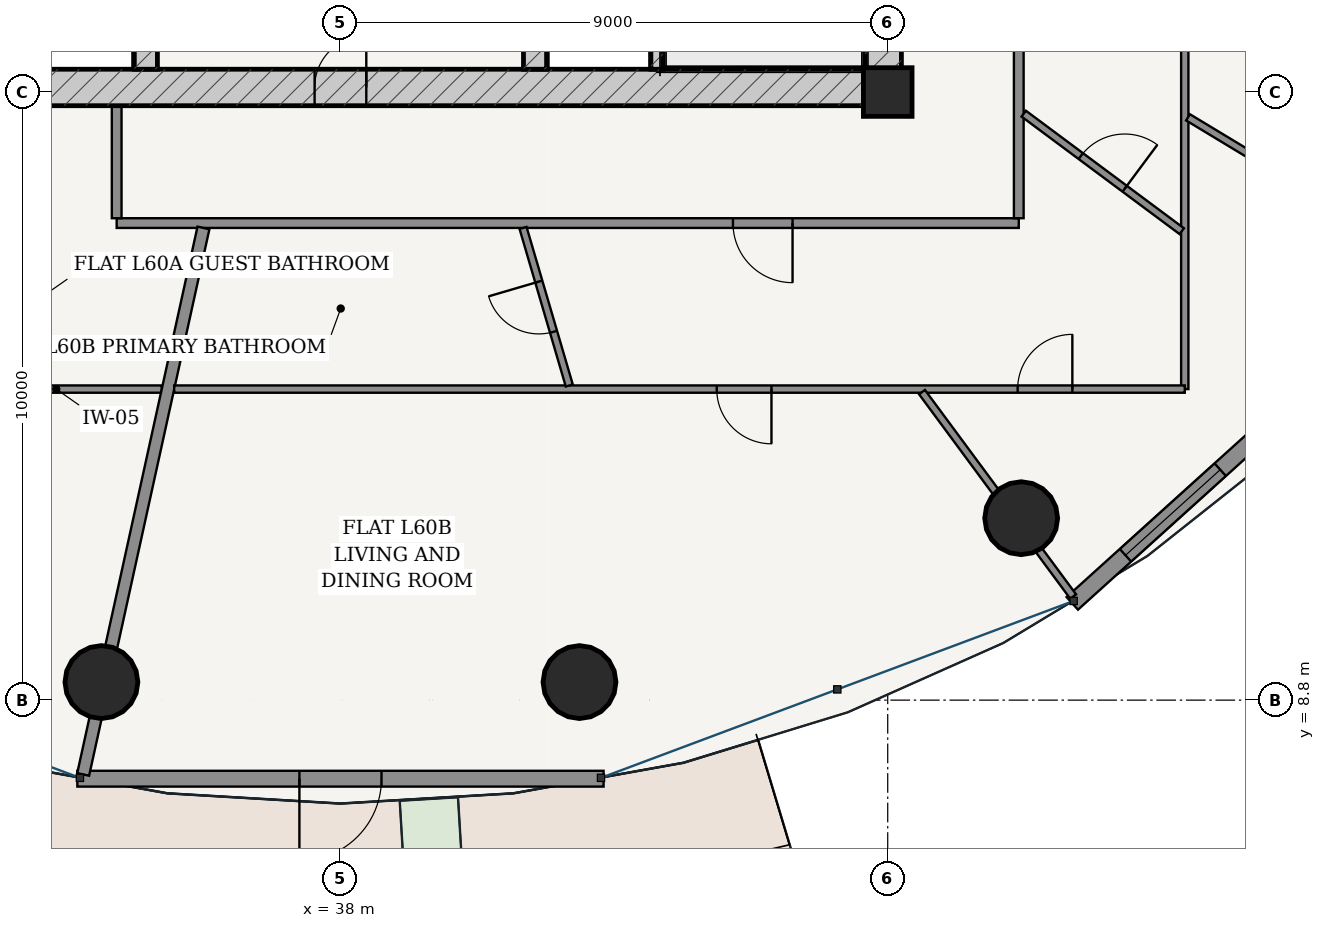
"""IFC4 building model, lengths in metres.
Left out: names, types, materials, properties, quantities, classifications, styles, units other than length and angle.
Written with IfcOpenShell. Run it as: python <this file> out.ifc"""

import sys

from ifc_helpers import new_model, si_unit, direction, frame, frame_2d, origin, origin_2d, place, context, subcontext, project, spatial, rectangle, hollow_circle, extrude, source, transform, mapped, element, fill, save


model = new_model("IFC4")
c1 = context("Model", 3, precision=1e-05, world=origin(), true_north=direction((-0.2419218956, 0.970295726276)))
c2 = subcontext(c1, "Body", "Model", "MODEL_VIEW")
j1 = project(units=[si_unit("LENGTHUNIT", "METRE"), si_unit("PLANEANGLEUNIT", "RADIAN")], contexts=[c1])
p1 = place(None, origin())
s1 = spatial("IfcSite", under=j1, at=p1, CompositionType="ELEMENT")
p2 = place(p1, origin())
s2 = spatial("IfcBuilding", under=s1, at=p2, CompositionType="ELEMENT")
p3 = place(p2, frame((0.0, 0.0, 228.2)))
s3 = spatial("IfcBuildingStorey", under=s2, at=p3, CompositionType="ELEMENT", Elevation=228.2)
p4 = place(p3, frame((47.0, 18.8, 0.0), z_axis=(0.0, 0.0, 1.0), x_axis=(1.0, 0.0, 0.0)))
e1 = element("IfcColumn", 1, at=p4, inside=s3, PredefinedType="COLUMN", context=c2, shape_type="SweptSolid", body=[
    extrude(rectangle(XDim=0.8, YDim=0.8, at=origin_2d()), origin(), (0.0, 0.0, 1.0), 3.7),
])
p5 = place(p3, frame((28.775, 18.875, 0.0), z_axis=(0.0, 0.0, 1.0), x_axis=(1.0, 0.0, 0.0)))
e2 = element("IfcWall", 2, at=p5, inside=s3, PredefinedType="SHEAR", context=c2, shape_type="SweptSolid", body=[
    extrude(rectangle(XDim=18.45, YDim=0.6, at=frame_2d((9.225, 0.0))), origin(), (0.0, 0.0, 1.0), 3.435),
])
p6 = place(p5, frame((8.8, 0.0, 0.0)))
e3 = element("IfcOpeningElement", 3, at=p6, cuts=e2, PredefinedType="OPENING", context=c2, shape_type="SweptSolid", body=[
    extrude(rectangle(XDim=0.85, YDim=2.1, at=frame_2d((0.425, 1.05))), frame((0.0, 0.31, 0.0), z_axis=(0.0, -1.0, 0.0), x_axis=(1.0, 0.0, 0.0)), (0.0, 0.0, 1.0), 0.62),
])
p7 = place(p3, frame((46.925, 19.175, 0.0), z_axis=(0.0, 0.0, 1.0), x_axis=(0.0, 1.0, 0.0)))
e4 = element("IfcWall", 4, at=p7, inside=s3, PredefinedType="SHEAR", context=c2, shape_type="SweptSolid", body=[
    extrude(rectangle(XDim=15.25, YDim=0.6, at=frame_2d((7.625, 0.0))), origin(), (0.0, 0.0, 1.0), 3.435),
])
p8 = place(p7, frame((9.875, 0.0, 0.0)))
e5 = element("IfcOpeningElement", 5, at=p8, cuts=e4, PredefinedType="OPENING", context=c2, shape_type="SweptSolid", body=[
    extrude(rectangle(XDim=1.5, YDim=2.2, at=frame_2d((0.75, 1.1))), frame((0.0, 0.31, 0.0), z_axis=(0.0, -1.0, 0.0), x_axis=(1.0, 0.0, 0.0)), (0.0, 0.0, 1.0), 0.62),
])
p9 = place(p3, frame((43.205, 19.175, 0.0), z_axis=(0.0, 0.0, 1.0), x_axis=(0.0, 1.0, 0.0)))
e6 = element("IfcWall", 6, at=p9, inside=s3, PredefinedType="SOLIDWALL", context=c2, shape_type="SweptSolid", body=[
    extrude(rectangle(XDim=7.375, YDim=0.2, at=frame_2d((3.688, 0.0))), origin(), (0.0, 0.0, 1.0), 3.435),
])
p10 = place(p3, frame((34.8, 19.175, 0.0), z_axis=(0.0, 0.0, 1.0), x_axis=(0.0, 1.0, 0.0)))
e7 = element("IfcWall", 7, at=p10, inside=s3, PredefinedType="SHEAR", context=c2, shape_type="SweptSolid", body=[
    extrude(rectangle(XDim=15.25, YDim=0.38, at=frame_2d((7.625, 0.0))), origin(), (0.0, 0.0, 1.0), 3.435),
])
p11 = place(p10, frame((7.8, 0.0, 0.0)))
e8 = element("IfcOpeningElement", 8, at=p11, cuts=e7, PredefinedType="OPENING", context=c2, shape_type="SweptSolid", body=[
    extrude(rectangle(XDim=1.05, YDim=2.15, at=frame_2d((0.525, 1.075))), frame((0.0, 0.2, 0.0), z_axis=(0.0, -1.0, 0.0), x_axis=(1.0, 0.0, 0.0)), (0.0, 0.0, 1.0), 0.4),
])
p12 = place(p3, frame((41.2, 19.175, 0.0), z_axis=(0.0, 0.0, 1.0), x_axis=(0.0, 1.0, 0.0)))
e9 = element("IfcWall", 9, at=p12, inside=s3, PredefinedType="SHEAR", context=c2, shape_type="SweptSolid", body=[
    extrude(rectangle(XDim=15.25, YDim=0.38, at=frame_2d((7.625, 0.0))), origin(), (0.0, 0.0, 1.0), 3.435),
])
p13 = place(p12, frame((7.8, 0.0, 0.0)))
e10 = element("IfcOpeningElement", 10, at=p13, cuts=e9, PredefinedType="OPENING", context=c2, shape_type="SweptSolid", body=[
    extrude(rectangle(XDim=1.05, YDim=2.15, at=frame_2d((0.525, 1.075))), frame((0.0, 0.2, 0.0), z_axis=(0.0, -1.0, 0.0), x_axis=(1.0, 0.0, 0.0)), (0.0, 0.0, 1.0), 0.4),
])
for number, where, z_axis, x_axis in (
    (11, (34.069, 9.097, 0.0), (0.0, 0.0, 1.0), (1.0, 0.0, 0.0)),
    (12, (41.931, 9.097, 0.0), (0.0, 0.0, 1.0), (1.0, 0.0, 0.0)),
    (13, (49.195, 11.792, 0.0), (0.0, 0.0, 1.0), (1.0, 0.0, 0.0)),
):
    element("IfcColumn", number, at=place(p3, frame(where, z_axis=z_axis, x_axis=x_axis)), inside=s3, PredefinedType="COLUMN", context=c2, shape_type="SweptSolid", body=[
        extrude(hollow_circle(Radius=0.6, WallThickness=0.038, at=origin_2d()), origin(), (0.0, 0.0, 1.0), 3.7),
    ])
p14 = place(p3, frame((33.673, 7.508, 0.0), z_axis=(0.0, 0.0, 1.0), x_axis=(1.0, 0.0, 0.0)))
e14 = element("IfcWall", 14, at=p14, inside=s3, PredefinedType="SOLIDWALL", context=c2, shape_type="SweptSolid", body=[
    extrude(rectangle(XDim=8.654, YDim=0.26, at=frame_2d((4.327, 0.0))), origin(), (0.0, 0.0, 1.0), 3.435),
])
p15 = place(p14, frame((3.652, 0.0, 0.0)))
e15 = element("IfcOpeningElement", 15, at=p15, cuts=e14, PredefinedType="OPENING", context=c2, shape_type="SweptSolid", body=[
    extrude(rectangle(XDim=1.35, YDim=2.2, at=frame_2d((0.675, 1.1))), frame((0.0, 0.14, 0.0), z_axis=(0.0, -1.0, 0.0), x_axis=(1.0, 0.0, 0.0)), (0.0, 0.0, 1.0), 0.28),
])
p16 = place(p3, frame((50.035, 10.391, 0.0), z_axis=(0.0, 0.0, 1.0), x_axis=(0.741986838603, 0.670414447443, 0.0)))
e16 = element("IfcWall", 16, at=p16, inside=s3, PredefinedType="SOLIDWALL", context=c2, shape_type="SweptSolid", body=[
    extrude(rectangle(XDim=8.255, YDim=0.28, at=frame_2d((4.127, 0.0))), origin(), (0.0, 0.0, 1.0), 3.435),
])
p17 = place(p16, frame((1.179, 0.0, 0.85)))
e17 = element("IfcOpeningElement", 17, at=p17, cuts=e16, PredefinedType="OPENING", context=c2, shape_type="SweptSolid", body=[
    extrude(rectangle(XDim=2.1, YDim=1.95, at=frame_2d((1.05, 0.975))), frame((0.0, 0.15, 0.0), z_axis=(0.0, -1.0, 0.0), x_axis=(1.0, 0.0, 0.0)), (0.0, 0.0, 1.0), 0.3),
])
p18 = place(p16, frame((4.976, 0.0, 0.85)))
e18 = element("IfcOpeningElement", 18, at=p18, cuts=e16, PredefinedType="OPENING", context=c2, shape_type="SweptSolid", body=[
    extrude(rectangle(XDim=2.1, YDim=1.95, at=frame_2d((1.05, 0.975))), frame((0.0, 0.15, 0.0), z_axis=(0.0, -1.0, 0.0), x_axis=(1.0, 0.0, 0.0)), (0.0, 0.0, 1.0), 0.3),
])
p19 = place(p3, frame((34.32, 16.645, 0.0), z_axis=(0.0, 0.0, 1.0), x_axis=(1.0, 0.0, 0.0)))
e19 = element("IfcWall", 19, at=p19, inside=s3, PredefinedType="PARTITIONING", context=c2, shape_type="SweptSolid", body=[
    extrude(rectangle(XDim=14.835, YDim=0.16, at=frame_2d((7.417, 0.0))), origin(), (0.0, 0.0, 1.0), 2.951),
])
p20 = place(p19, frame((10.135, 0.0, 0.0)))
e20 = element("IfcOpeningElement", 20, at=p20, cuts=e19, PredefinedType="OPENING", context=c2, shape_type="SweptSolid", body=[
    extrude(rectangle(XDim=0.98, YDim=2.2, at=frame_2d((0.49, 1.1))), frame((0.0, 0.09, 0.0), z_axis=(0.0, -1.0, 0.0), x_axis=(1.0, 0.0, 0.0)), (0.0, 0.0, 1.0), 0.18),
])
p21 = place(p3, frame((34.32, 16.725, 0.0), z_axis=(0.0, 0.0, 1.0), x_axis=(0.0, 1.0, 0.0)))
e21 = element("IfcWall", 21, at=p21, inside=s3, PredefinedType="PARTITIONING", context=c2, shape_type="SweptSolid", body=[
    extrude(rectangle(XDim=1.85, YDim=0.16, at=frame_2d((0.925, 0.0))), origin(), (0.0, 0.0, 1.0), 3.435),
])
p22 = place(p3, frame((49.155, 16.725, 0.0), z_axis=(0.0, 0.0, 1.0), x_axis=(0.0, 1.0, 0.0)))
e22 = element("IfcWall", 22, at=p22, inside=s3, PredefinedType="PARTITIONING", context=c2, shape_type="SweptSolid", body=[
    extrude(rectangle(XDim=18.3, YDim=0.16, at=frame_2d((9.15, 0.0))), origin(), (0.0, 0.0, 1.0), 2.951),
])
p23 = place(p3, frame((35.062, 13.915, 0.0), z_axis=(0.0, 0.0, 1.0), x_axis=(-1.0, 0.0, 0.0)))
e23 = element("IfcWall", 23, at=p23, inside=s3, PredefinedType="PARTITIONING", context=c2, shape_type="SweptSolid", body=[
    extrude(rectangle(XDim=3.472, YDim=0.12, at=frame_2d((1.736, 0.0))), origin(), (0.0, 0.0, 1.0), 2.951),
])
p24 = place(p3, frame((35.747, 16.565, 0.0), z_axis=(0.0, 0.0, 1.0), x_axis=(-0.214957946814, -0.976623305631, 0.0)))
e24 = element("IfcWall", 24, at=p24, inside=s3, PredefinedType="PARTITIONING", context=c2, shape_type="SweptSolid", body=[
    extrude(rectangle(XDim=9.202, YDim=0.2, at=frame_2d((4.601, 0.0))), origin(), (0.0, 0.0, 1.0), 2.951),
])
p25 = place(p3, frame((51.885, 37.835, 0.0), z_axis=(0.0, 0.0, 1.0), x_axis=(0.0, -1.0, 0.0)))
e25 = element("IfcWall", 25, at=p25, inside=s3, PredefinedType="PARTITIONING", context=c2, shape_type="SweptSolid", body=[
    extrude(rectangle(XDim=23.92, YDim=0.12, at=frame_2d((11.96, 0.0))), origin(), (0.0, 0.0, 1.0), 2.951),
])
p26 = place(p25, frame((16.558, 0.0, 0.0)))
e26 = element("IfcOpeningElement", 26, at=p26, cuts=e25, PredefinedType="OPENING", context=c2, shape_type="SweptSolid", body=[
    extrude(rectangle(XDim=0.9, YDim=2.15, at=frame_2d((0.45, 1.075))), frame((0.0, 0.07, 0.0), z_axis=(0.0, -1.0, 0.0), x_axis=(1.0, 0.0, 0.0)), (0.0, 0.0, 1.0), 0.14),
])
p27 = place(p3, frame((51.885, 13.915, 0.0), z_axis=(0.0, 0.0, 1.0), x_axis=(-1.0, 0.0, 0.0)))
e27 = element("IfcWall", 27, at=p27, inside=s3, PredefinedType="PARTITIONING", context=c2, shape_type="SweptSolid", body=[
    extrude(rectangle(XDim=16.619, YDim=0.12, at=frame_2d((8.31, 0.0))), origin(), (0.0, 0.0, 1.0), 2.951),
])
p28 = place(p27, frame((6.797, 0.0, 0.0)))
e28 = element("IfcOpeningElement", 28, at=p28, cuts=e27, PredefinedType="OPENING", context=c2, shape_type="SweptSolid", body=[
    extrude(rectangle(XDim=0.9, YDim=2.15, at=frame_2d((0.45, 1.075))), frame((0.0, 0.07, 0.0), z_axis=(0.0, -1.0, 0.0), x_axis=(1.0, 0.0, 0.0)), (0.0, 0.0, 1.0), 0.14),
])
p29 = place(p27, frame((1.849, 0.0, 0.0)))
e29 = element("IfcOpeningElement", 29, at=p29, cuts=e27, PredefinedType="OPENING", context=c2, shape_type="SweptSolid", body=[
    extrude(rectangle(XDim=0.9, YDim=2.15, at=frame_2d((0.45, 1.075))), frame((0.0, 0.07, 0.0), z_axis=(0.0, -1.0, 0.0), x_axis=(1.0, 0.0, 0.0)), (0.0, 0.0, 1.0), 0.14),
])
p30 = place(p3, frame((47.564, 13.865, 0.0), z_axis=(0.0, 0.0, 1.0), x_axis=(0.594501071103, -0.804094818076, 0.0)))
e30 = element("IfcWall", 30, at=p30, inside=s3, PredefinedType="PARTITIONING", context=c2, shape_type="SweptSolid", body=[
    extrude(rectangle(XDim=4.181, YDim=0.12, at=frame_2d((2.09, 0.0))), origin(), (0.0, 0.0, 1.0), 2.951),
])
p31 = place(p3, frame((51.938, 18.384, 0.0), z_axis=(0.0, 0.0, 1.0), x_axis=(0.856058483833, -0.516878972543, 0.0)))
e31 = element("IfcWall", 31, at=p31, inside=s3, PredefinedType="PARTITIONING", context=c2, shape_type="SweptSolid", body=[
    extrude(rectangle(XDim=4.787, YDim=0.12, at=frame_2d((2.393, 0.0))), origin(), (0.0, 0.0, 1.0), 2.951),
])
p32 = place(p3, frame((41.003, 16.565, 0.0), z_axis=(0.0, 0.0, 1.0), x_axis=(0.281617901256, -0.959526632091, 0.0)))
e32 = element("IfcWall", 32, at=p32, inside=s3, PredefinedType="PARTITIONING", context=c2, shape_type="SweptSolid", body=[
    extrude(rectangle(XDim=2.7, YDim=0.12, at=frame_2d((1.35, 0.0))), origin(), (0.0, 0.0, 1.0), 3.11),
])
p33 = place(p32, frame((0.92, 0.0, 0.0)))
e33 = element("IfcOpeningElement", 33, at=p33, cuts=e32, PredefinedType="OPENING", context=c2, shape_type="SweptSolid", body=[
    extrude(rectangle(XDim=0.86, YDim=2.15, at=frame_2d((0.43, 1.075))), frame((0.0, 0.07, 0.0), z_axis=(0.0, -1.0, 0.0), x_axis=(1.0, 0.0, 0.0)), (0.0, 0.0, 1.0), 0.14),
])
p34 = place(p3, frame((49.237, 18.444, 0.0), z_axis=(0.0, 0.0, 1.0), x_axis=(0.802454010275, -0.596713969497, 0.0)))
e34 = element("IfcWall", 34, at=p34, inside=s3, PredefinedType="PARTITIONING", context=c2, shape_type="SweptSolid", body=[
    extrude(rectangle(XDim=3.238, YDim=0.12, at=frame_2d((1.619, 0.0))), origin(), (0.0, 0.0, 1.0), 3.11),
])
p35 = place(p34, frame((1.169, 0.0, 0.0)))
e35 = element("IfcOpeningElement", 35, at=p35, cuts=e34, PredefinedType="OPENING", context=c2, shape_type="SweptSolid", body=[
    extrude(rectangle(XDim=0.9, YDim=2.15, at=frame_2d((0.45, 1.075))), frame((0.0, 0.07, 0.0), z_axis=(0.0, -1.0, 0.0), x_axis=(1.0, 0.0, 0.0)), (0.0, 0.0, 1.0), 0.14),
])
m1 = source(origin(), c2, "Body", "SweptSolid", [
    extrude(rectangle(XDim=1.35, YDim=2.2, at=frame_2d((0.675, 1.1))), frame((0.0, 0.025, 0.0), z_axis=(0.0, -1.0, 0.0), x_axis=(1.0, 0.0, 0.0)), (0.0, 0.0, 1.0), 0.05),
])
p36 = place(p15, frame((1.35, 0.0, 0.0), z_axis=(0.0, 0.0, 1.0), x_axis=(-1.0, 0.0, 0.0)))
e36 = element("IfcDoor", 36, at=p36, inside=s3, OperationType="SINGLE_SWING_RIGHT", PredefinedType="DOOR", context=c2, shape_type="MappedRepresentation", body=[
    mapped(m1, transform((0.0, 0.0, 0.0), scale=1.0)),
])
fill(e15, e36)
m2 = source(origin(), c2, "Body", "SweptSolid", [
    extrude(rectangle(XDim=2.1, YDim=1.95, at=frame_2d((1.05, 0.975))), frame((0.0, 0.03, 0.0), z_axis=(0.0, -1.0, 0.0), x_axis=(1.0, 0.0, 0.0)), (0.0, 0.0, 1.0), 0.06),
])
p37 = place(p17, origin())
e37 = element("IfcWindow", 37, at=p37, inside=s3, PartitioningType="SINGLE_PANEL", PredefinedType="WINDOW", context=c2, shape_type="MappedRepresentation", body=[
    mapped(m2, transform((0.0, 0.0, 0.0), scale=1.0)),
])
fill(e17, e37)
m3 = source(origin(), c2, "Body", "SweptSolid", [
    extrude(rectangle(XDim=0.85, YDim=2.1, at=frame_2d((0.425, 1.05))), frame((0.0, 0.025, 0.0), z_axis=(0.0, -1.0, 0.0), x_axis=(1.0, 0.0, 0.0)), (0.0, 0.0, 1.0), 0.05),
])
p38 = place(p6, origin())
e38 = element("IfcDoor", 38, at=p38, inside=s3, OperationType="SINGLE_SWING_RIGHT", PredefinedType="DOOR", context=c2, shape_type="MappedRepresentation", body=[
    mapped(m3, transform((0.0, 0.0, 0.0), scale=1.0)),
])
fill(e3, e38)
m4 = source(origin(), c2, "Body", "SweptSolid", [
    extrude(rectangle(XDim=0.98, YDim=2.2, at=frame_2d((0.49, 1.1))), frame((0.0, 0.025, 0.0), z_axis=(0.0, -1.0, 0.0), x_axis=(1.0, 0.0, 0.0)), (0.0, 0.0, 1.0), 0.05),
])
p39 = place(p20, frame((0.98, 0.0, 0.0), z_axis=(0.0, 0.0, 1.0), x_axis=(-1.0, 0.0, 0.0)))
e39 = element("IfcDoor", 39, at=p39, inside=s3, OperationType="SINGLE_SWING_LEFT", PredefinedType="DOOR", context=c2, shape_type="MappedRepresentation", body=[
    mapped(m4, transform((0.0, 0.0, 0.0), scale=1.0)),
])
fill(e20, e39)
m5 = source(origin(), c2, "Body", "SweptSolid", [
    extrude(rectangle(XDim=0.86, YDim=2.15, at=frame_2d((0.43, 1.075))), frame((0.0, 0.025, 0.0), z_axis=(0.0, -1.0, 0.0), x_axis=(1.0, 0.0, 0.0)), (0.0, 0.0, 1.0), 0.05),
])
p40 = place(p33, frame((0.86, 0.0, 0.0), z_axis=(0.0, 0.0, 1.0), x_axis=(-1.0, 0.0, 0.0)))
e40 = element("IfcDoor", 40, at=p40, inside=s3, OperationType="SINGLE_SWING_RIGHT", PredefinedType="DOOR", context=c2, shape_type="MappedRepresentation", body=[
    mapped(m5, transform((0.0, 0.0, 0.0), scale=1.0)),
])
fill(e33, e40)
m6 = source(origin(), c2, "Body", "SweptSolid", [
    extrude(rectangle(XDim=0.9, YDim=2.15, at=frame_2d((0.45, 1.075))), frame((0.0, 0.025, 0.0), z_axis=(0.0, -1.0, 0.0), x_axis=(1.0, 0.0, 0.0)), (0.0, 0.0, 1.0), 0.05),
])
p41 = place(p28, origin())
e41 = element("IfcDoor", 41, at=p41, inside=s3, OperationType="SINGLE_SWING_LEFT", PredefinedType="DOOR", context=c2, shape_type="MappedRepresentation", body=[
    mapped(m6, transform((0.0, 0.0, 0.0), scale=1.0)),
])
fill(e28, e41)
p42 = place(p35, origin())
e42 = element("IfcDoor", 42, at=p42, inside=s3, OperationType="SINGLE_SWING_RIGHT", PredefinedType="DOOR", context=c2, shape_type="MappedRepresentation", body=[
    mapped(m6, transform((0.0, 0.0, 0.0), scale=1.0)),
])
fill(e35, e42)
p43 = place(p29, frame((0.9, 0.0, 0.0), z_axis=(0.0, 0.0, 1.0), x_axis=(-1.0, 0.0, 0.0)))
e43 = element("IfcDoor", 43, at=p43, inside=s3, OperationType="SINGLE_SWING_RIGHT", PredefinedType="DOOR", context=c2, shape_type="MappedRepresentation", body=[
    mapped(m6, transform((0.0, 0.0, 0.0), scale=1.0)),
])
fill(e29, e43)
save(model, sys.argv[1])
